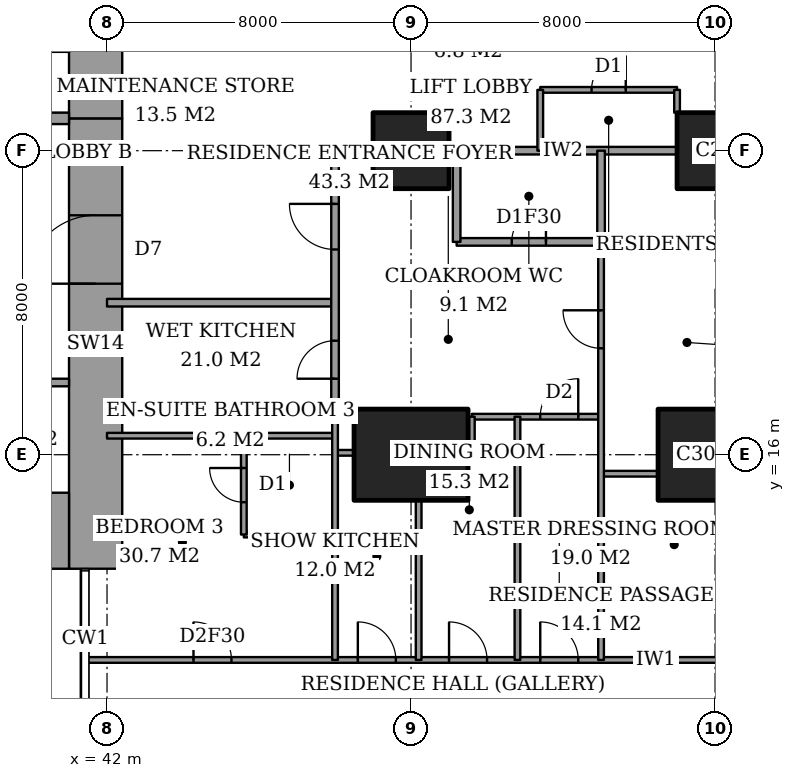
"""IFC4 building model, lengths in metres.
Left out: names, types, materials, properties, quantities, classifications, styles, units other than length and angle.
Written with IfcOpenShell. Run it as: python <this file> out.ifc"""

import sys

from ifc_helpers import new_model, si_unit, direction, frame, frame_2d, origin, origin_2d, place, context, subcontext, project, spatial, rectangle, extrude, element, fill, save


model = new_model("IFC4")
c1 = context("Model", 3, precision=1e-05, world=origin(), true_north=direction((0.0, 1.0)))
c2 = subcontext(c1, "Body", "Model", "MODEL_VIEW")
j1 = project(units=[si_unit("LENGTHUNIT", "METRE"), si_unit("PLANEANGLEUNIT", "RADIAN")], contexts=[c1])
p1 = place(None, origin())
s1 = spatial("IfcSite", under=j1, at=p1, CompositionType="ELEMENT")
p2 = place(p1, origin())
s2 = spatial("IfcBuilding", under=s1, at=p2, CompositionType="ELEMENT")
p3 = place(p2, frame((0.0, 0.0, 58.4)))
s3 = spatial("IfcBuildingStorey", under=s2, at=p3, CompositionType="ELEMENT", Elevation=58.4)
p4 = place(p3, frame((50.0, 16.0, 0.0), z_axis=(0.0, 0.0, 1.0), x_axis=(1.0, 0.0, 0.0)))
e1 = element("IfcColumn", 1, at=p4, inside=s3, PredefinedType="COLUMN", context=c2, shape_type="SweptSolid", body=[
    extrude(rectangle(XDim=3.0, YDim=2.4, at=origin_2d()), origin(), (0.0, 0.0, 1.0), 3.6),
])
p5 = place(p3, frame((50.0, 24.0, 0.0), z_axis=(0.0, 0.0, 1.0), x_axis=(1.0, 0.0, 0.0)))
e2 = element("IfcColumn", 2, at=p5, inside=s3, PredefinedType="COLUMN", context=c2, shape_type="SweptSolid", body=[
    extrude(rectangle(XDim=2.0, YDim=2.0, at=origin_2d()), origin(), (0.0, 0.0, 1.0), 3.6),
])
p6 = place(p3, frame((58.0, 16.0, 0.0), z_axis=(0.0, 0.0, 1.0), x_axis=(1.0, 0.0, 0.0)))
e3 = element("IfcColumn", 3, at=p6, inside=s3, PredefinedType="COLUMN", context=c2, shape_type="SweptSolid", body=[
    extrude(rectangle(XDim=3.0, YDim=2.4, at=origin_2d()), origin(), (0.0, 0.0, 1.0), 3.6),
])
p7 = place(p3, frame((58.0, 24.0, 0.0), z_axis=(0.0, 0.0, 1.0), x_axis=(1.0, 0.0, 0.0)))
e4 = element("IfcColumn", 4, at=p7, inside=s3, PredefinedType="COLUMN", context=c2, shape_type="SweptSolid", body=[
    extrude(rectangle(XDim=2.0, YDim=2.0, at=origin_2d()), origin(), (0.0, 0.0, 1.0), 3.6),
])
p8 = place(p3, frame((37.85, 14.0, 0.0), z_axis=(0.0, 0.0, 1.0), x_axis=(1.0, 0.0, 0.0)))
e5 = element("IfcWall", 5, at=p8, inside=s3, PredefinedType="SHEAR", context=c2, shape_type="SweptSolid", body=[
    extrude(rectangle(XDim=3.15, YDim=2.0, at=frame_2d((1.575, 0.0))), origin(), (0.0, 0.0, 1.0), 3.6),
])
p9 = place(p3, frame((41.7, 13.0, 0.0), z_axis=(0.0, 0.0, 1.0), x_axis=(0.0, 1.0, 0.0)))
e6 = element("IfcWall", 6, at=p9, inside=s3, PredefinedType="SHEAR", context=c2, shape_type="SweptSolid", body=[
    extrude(rectangle(XDim=11.85, YDim=1.4, at=frame_2d((5.925, 0.0))), origin(), (0.0, 0.0, 1.0), 3.6),
])
p10 = place(p9, frame((7.5, 0.0, 0.0)))
e7 = element("IfcOpeningElement", 7, at=p10, cuts=e6, PredefinedType="OPENING", context=c2, shape_type="SweptSolid", body=[
    extrude(rectangle(XDim=1.8, YDim=2.4, at=frame_2d((0.9, 1.2))), frame((0.0, 0.71, 0.0), z_axis=(0.0, -1.0, 0.0), x_axis=(1.0, 0.0, 0.0)), (0.0, 0.0, 1.0), 1.42),
])
p11 = place(p3, frame((41.7, 24.85, 0.0), z_axis=(0.0, 0.0, 1.0), x_axis=(0.0, 1.0, 0.0)))
e8 = element("IfcWall", 8, at=p11, inside=s3, PredefinedType="SHEAR", context=c2, shape_type="SweptSolid", body=[
    extrude(rectangle(XDim=10.15, YDim=1.4, at=frame_2d((5.075, 0.0))), origin(), (0.0, 0.0, 1.0), 3.6),
])
p12 = place(p3, frame((37.85, 24.85, 0.0), z_axis=(0.0, 0.0, 1.0), x_axis=(1.0, 0.0, 0.0)))
e9 = element("IfcWall", 9, at=p12, inside=s3, PredefinedType="SHEAR", context=c2, shape_type="SweptSolid", body=[
    extrude(rectangle(XDim=3.15, YDim=0.3, at=frame_2d((1.575, 0.0))), origin(), (0.0, 0.0, 1.0), 3.6),
])
p13 = place(p12, frame((0.95, 0.0, 0.0)))
e10 = element("IfcOpeningElement", 10, at=p13, cuts=e9, PredefinedType="OPENING", context=c2, shape_type="SweptSolid", body=[
    extrude(rectangle(XDim=1.0, YDim=2.1, at=frame_2d((0.5, 1.05))), frame((0.0, 0.16, 0.0), z_axis=(0.0, -1.0, 0.0), x_axis=(1.0, 0.0, 0.0)), (0.0, 0.0, 1.0), 0.32),
])
p14 = place(p3, frame((41.439, 10.6, 0.0), z_axis=(0.0, 0.0, 1.0), x_axis=(1.0, 0.0, 0.0)))
e11 = element("IfcWall", 11, at=p14, inside=s3, PredefinedType="PARTITIONING", context=c2, shape_type="SweptSolid", body=[
    extrude(rectangle(XDim=25.011, YDim=0.15, at=frame_2d((12.505, 0.0))), origin(), (0.0, 0.0, 1.0), 3.35),
])
p15 = place(p14, frame((11.961, 0.0, 0.0)))
e12 = element("IfcOpeningElement", 12, at=p15, cuts=e11, PredefinedType="OPENING", context=c2, shape_type="SweptSolid", body=[
    extrude(rectangle(XDim=1.0, YDim=2.1, at=frame_2d((0.5, 1.05))), frame((0.0, 0.085, 0.0), z_axis=(0.0, -1.0, 0.0), x_axis=(1.0, 0.0, 0.0)), (0.0, 0.0, 1.0), 0.17),
])
p16 = place(p14, frame((20.924, 0.0, 0.0)))
e13 = element("IfcOpeningElement", 13, at=p16, cuts=e11, PredefinedType="OPENING", context=c2, shape_type="SweptSolid", body=[
    extrude(rectangle(XDim=1.0, YDim=2.1, at=frame_2d((0.5, 1.05))), frame((0.0, 0.085, 0.0), z_axis=(0.0, -1.0, 0.0), x_axis=(1.0, 0.0, 0.0)), (0.0, 0.0, 1.0), 0.17),
])
p17 = place(p14, frame((9.561, 0.0, 0.0)))
e14 = element("IfcOpeningElement", 14, at=p17, cuts=e11, PredefinedType="OPENING", context=c2, shape_type="SweptSolid", body=[
    extrude(rectangle(XDim=1.0, YDim=2.1, at=frame_2d((0.5, 1.05))), frame((0.0, 0.085, 0.0), z_axis=(0.0, -1.0, 0.0), x_axis=(1.0, 0.0, 0.0)), (0.0, 0.0, 1.0), 0.17),
])
p18 = place(p14, frame((7.161, 0.0, 0.0)))
e15 = element("IfcOpeningElement", 15, at=p18, cuts=e11, PredefinedType="OPENING", context=c2, shape_type="SweptSolid", body=[
    extrude(rectangle(XDim=1.0, YDim=2.1, at=frame_2d((0.5, 1.05))), frame((0.0, 0.085, 0.0), z_axis=(0.0, -1.0, 0.0), x_axis=(1.0, 0.0, 0.0)), (0.0, 0.0, 1.0), 0.17),
])
p19 = place(p14, frame((2.836, 0.0, 0.0)))
e16 = element("IfcOpeningElement", 16, at=p19, cuts=e11, PredefinedType="OPENING", context=c2, shape_type="SweptSolid", body=[
    extrude(rectangle(XDim=1.0, YDim=2.1, at=frame_2d((0.5, 1.05))), frame((0.0, 0.085, 0.0), z_axis=(0.0, -1.0, 0.0), x_axis=(1.0, 0.0, 0.0)), (0.0, 0.0, 1.0), 0.17),
])
p20 = place(p3, frame((45.6, 13.9, 0.0), z_axis=(0.0, 0.0, 1.0), x_axis=(1.0, 0.0, 0.0)))
e17 = element("IfcWall", 17, at=p20, inside=s3, PredefinedType="PARTITIONING", context=c2, shape_type="SweptSolid", body=[
    extrude(rectangle(XDim=2.4, YDim=0.15, at=frame_2d((1.2, 0.0))), origin(), (0.0, 0.0, 1.0), 3.35),
])
p21 = place(p3, frame((55.0, 15.5, 0.0), z_axis=(0.0, 0.0, 1.0), x_axis=(1.0, 0.0, 0.0)))
e18 = element("IfcWall", 18, at=p21, inside=s3, PredefinedType="PARTITIONING", context=c2, shape_type="SweptSolid", body=[
    extrude(rectangle(XDim=1.5, YDim=0.15, at=frame_2d((0.75, 0.0))), origin(), (0.0, 0.0, 1.0), 3.35),
])
p22 = place(p3, frame((48.0, 16.05, 0.0), z_axis=(0.0, 0.0, 1.0), x_axis=(1.0, 0.0, 0.0)))
e19 = element("IfcWall", 19, at=p22, inside=s3, PredefinedType="PARTITIONING", context=c2, shape_type="SweptSolid", body=[
    extrude(rectangle(XDim=0.5, YDim=0.15, at=frame_2d((0.25, 0.0))), origin(), (0.0, 0.0, 1.0), 2.634),
])
p23 = place(p3, frame((42.0, 16.5, 0.0), z_axis=(0.0, 0.0, 1.0), x_axis=(1.0, 0.0, 0.0)))
e20 = element("IfcWall", 20, at=p23, inside=s3, PredefinedType="PARTITIONING", context=c2, shape_type="SweptSolid", body=[
    extrude(rectangle(XDim=6.0, YDim=0.15, at=frame_2d((3.0, 0.0))), origin(), (0.0, 0.0, 1.0), 3.35),
])
p24 = place(p3, frame((51.6, 17.0, 0.0), z_axis=(0.0, 0.0, 1.0), x_axis=(1.0, 0.0, 0.0)))
e21 = element("IfcWall", 21, at=p24, inside=s3, PredefinedType="PARTITIONING", context=c2, shape_type="SweptSolid", body=[
    extrude(rectangle(XDim=3.4, YDim=0.15, at=frame_2d((1.7, 0.0))), origin(), (0.0, 0.0, 1.0), 3.35),
])
p25 = place(p24, frame((1.8, 0.0, 0.0)))
e22 = element("IfcOpeningElement", 22, at=p25, cuts=e21, PredefinedType="OPENING", context=c2, shape_type="SweptSolid", body=[
    extrude(rectangle(XDim=1.0, YDim=2.1, at=frame_2d((0.5, 1.05))), frame((0.0, 0.085, 0.0), z_axis=(0.0, -1.0, 0.0), x_axis=(1.0, 0.0, 0.0)), (0.0, 0.0, 1.0), 0.17),
])
p26 = place(p3, frame((42.0, 20.0, 0.0), z_axis=(0.0, 0.0, 1.0), x_axis=(1.0, 0.0, 0.0)))
e23 = element("IfcWall", 23, at=p26, inside=s3, PredefinedType="PARTITIONING", context=c2, shape_type="SweptSolid", body=[
    extrude(rectangle(XDim=6.0, YDim=0.2, at=frame_2d((3.0, 0.0))), origin(), (0.0, 0.0, 1.0), 3.35),
])
p27 = place(p3, frame((51.2, 21.6, 0.0), z_axis=(0.0, 0.0, 1.0), x_axis=(1.0, 0.0, 0.0)))
e24 = element("IfcWall", 24, at=p27, inside=s3, PredefinedType="PARTITIONING", context=c2, shape_type="SweptSolid", body=[
    extrude(rectangle(XDim=3.8, YDim=0.2, at=frame_2d((1.9, 0.0))), origin(), (0.0, 0.0, 1.0), 3.35),
])
p28 = place(p27, frame((1.45, 0.0, 0.0)))
e25 = element("IfcOpeningElement", 25, at=p28, cuts=e24, PredefinedType="OPENING", context=c2, shape_type="SweptSolid", body=[
    extrude(rectangle(XDim=0.9, YDim=2.1, at=frame_2d((0.45, 1.05))), frame((0.0, 0.11, 0.0), z_axis=(0.0, -1.0, 0.0), x_axis=(1.0, 0.0, 0.0)), (0.0, 0.0, 1.0), 0.22),
])
p29 = place(p3, frame((48.0, 24.0, 0.0), z_axis=(0.0, 0.0, 1.0), x_axis=(1.0, 0.0, 0.0)))
e26 = element("IfcWall", 26, at=p29, inside=s3, PredefinedType="PARTITIONING", context=c2, shape_type="SweptSolid", body=[
    extrude(rectangle(XDim=1.0, YDim=0.2, at=frame_2d((0.5, 0.0))), origin(), (0.0, 0.0, 1.0), 3.35),
])
p30 = place(p3, frame((51.0, 24.0, 0.0), z_axis=(0.0, 0.0, 1.0), x_axis=(1.0, 0.0, 0.0)))
e27 = element("IfcWall", 27, at=p30, inside=s3, PredefinedType="PARTITIONING", context=c2, shape_type="SweptSolid", body=[
    extrude(rectangle(XDim=6.0, YDim=0.2, at=frame_2d((3.0, 0.0))), origin(), (0.0, 0.0, 1.0), 3.35),
])
p31 = place(p3, frame((53.4, 25.6, 0.0), z_axis=(0.0, 0.0, 1.0), x_axis=(1.0, 0.0, 0.0)))
e28 = element("IfcWall", 28, at=p31, inside=s3, PredefinedType="PARTITIONING", context=c2, shape_type="SweptSolid", body=[
    extrude(rectangle(XDim=3.6, YDim=0.15, at=frame_2d((1.8, 0.0))), origin(), (0.0, 0.0, 1.0), 3.35),
])
p32 = place(p31, frame((1.35, 0.0, 0.0)))
e29 = element("IfcOpeningElement", 29, at=p32, cuts=e28, PredefinedType="OPENING", context=c2, shape_type="SweptSolid", body=[
    extrude(rectangle(XDim=0.9, YDim=2.1, at=frame_2d((0.45, 1.05))), frame((0.0, 0.085, 0.0), z_axis=(0.0, -1.0, 0.0), x_axis=(1.0, 0.0, 0.0)), (0.0, 0.0, 1.0), 0.17),
])
p33 = place(p3, frame((45.6, 13.9, 0.0), z_axis=(0.0, 0.0, 1.0), x_axis=(0.0, 1.0, 0.0)))
e30 = element("IfcWall", 30, at=p33, inside=s3, PredefinedType="PARTITIONING", context=c2, shape_type="SweptSolid", body=[
    extrude(rectangle(XDim=2.6, YDim=0.15, at=frame_2d((1.3, 0.0))), origin(), (0.0, 0.0, 1.0), 3.35),
])
p34 = place(p33, frame((0.85, 0.0, 0.0)))
e31 = element("IfcOpeningElement", 31, at=p34, cuts=e30, PredefinedType="OPENING", context=c2, shape_type="SweptSolid", body=[
    extrude(rectangle(XDim=0.9, YDim=2.1, at=frame_2d((0.45, 1.05))), frame((0.0, 0.085, 0.0), z_axis=(0.0, -1.0, 0.0), x_axis=(1.0, 0.0, 0.0)), (0.0, 0.0, 1.0), 0.17),
])
p35 = place(p3, frame((48.0, 17.0, 0.0), z_axis=(0.0, 0.0, 1.0), x_axis=(0.0, 1.0, 0.0)))
e32 = element("IfcWall", 32, at=p35, inside=s3, PredefinedType="PARTITIONING", context=c2, shape_type="SweptSolid", body=[
    extrude(rectangle(XDim=7.0, YDim=0.2, at=frame_2d((3.5, 0.0))), origin(), (0.0, 0.0, 1.0), 3.35),
])
p36 = place(p35, frame((4.4, 0.0, 0.0)))
e33 = element("IfcOpeningElement", 33, at=p36, cuts=e32, PredefinedType="OPENING", context=c2, shape_type="SweptSolid", body=[
    extrude(rectangle(XDim=1.2, YDim=2.4, at=frame_2d((0.6, 1.2))), frame((0.0, 0.11, 0.0), z_axis=(0.0, -1.0, 0.0), x_axis=(1.0, 0.0, 0.0)), (0.0, 0.0, 1.0), 0.22),
])
p37 = place(p35, frame((1.0, 0.0, 0.0)))
e34 = element("IfcOpeningElement", 34, at=p37, cuts=e32, PredefinedType="OPENING", context=c2, shape_type="SweptSolid", body=[
    extrude(rectangle(XDim=1.0, YDim=2.1, at=frame_2d((0.5, 1.05))), frame((0.0, 0.11, 0.0), z_axis=(0.0, -1.0, 0.0), x_axis=(1.0, 0.0, 0.0)), (0.0, 0.0, 1.0), 0.22),
])
p38 = place(p3, frame((48.0, 10.6, 0.0), z_axis=(0.0, 0.0, 1.0), x_axis=(0.0, 1.0, 0.0)))
e35 = element("IfcWall", 35, at=p38, inside=s3, PredefinedType="PARTITIONING", context=c2, shape_type="SweptSolid", body=[
    extrude(rectangle(XDim=6.4, YDim=0.15, at=frame_2d((3.2, 0.0))), origin(), (0.0, 0.0, 1.0), 3.35),
])
p39 = place(p3, frame((50.2, 10.6, 0.0), z_axis=(0.0, 0.0, 1.0), x_axis=(0.0, 1.0, 0.0)))
e36 = element("IfcWall", 36, at=p39, inside=s3, PredefinedType="PARTITIONING", context=c2, shape_type="SweptSolid", body=[
    extrude(rectangle(XDim=4.2, YDim=0.15, at=frame_2d((2.1, 0.0))), origin(), (0.0, 0.0, 1.0), 3.35),
])
p40 = place(p3, frame((51.2, 21.6, 0.0), z_axis=(0.0, 0.0, 1.0), x_axis=(0.0, 1.0, 0.0)))
e37 = element("IfcWall", 37, at=p40, inside=s3, PredefinedType="PARTITIONING", context=c2, shape_type="SweptSolid", body=[
    extrude(rectangle(XDim=2.4, YDim=0.2, at=frame_2d((1.2, 0.0))), origin(), (0.0, 0.0, 1.0), 3.35),
])
p41 = place(p3, frame((51.6, 16.05, 0.0), z_axis=(0.0, 0.0, 1.0), x_axis=(0.0, 1.0, 0.0)))
e38 = element("IfcWall", 38, at=p41, inside=s3, PredefinedType="PARTITIONING", context=c2, shape_type="SweptSolid", body=[
    extrude(rectangle(XDim=0.95, YDim=0.15, at=frame_2d((0.475, 0.0))), origin(), (0.0, 0.0, 1.0), 3.35),
])
p42 = place(p3, frame((52.8, 10.6, 0.0), z_axis=(0.0, 0.0, 1.0), x_axis=(0.0, 1.0, 0.0)))
e39 = element("IfcWall", 39, at=p42, inside=s3, PredefinedType="PARTITIONING", context=c2, shape_type="SweptSolid", body=[
    extrude(rectangle(XDim=6.4, YDim=0.15, at=frame_2d((3.2, 0.0))), origin(), (0.0, 0.0, 1.0), 3.35),
])
p43 = place(p3, frame((53.4, 24.0, 0.0), z_axis=(0.0, 0.0, 1.0), x_axis=(0.0, 1.0, 0.0)))
e40 = element("IfcWall", 40, at=p43, inside=s3, PredefinedType="PARTITIONING", context=c2, shape_type="SweptSolid", body=[
    extrude(rectangle(XDim=1.6, YDim=0.15, at=frame_2d((0.8, 0.0))), origin(), (0.0, 0.0, 1.0), 3.35),
])
p44 = place(p3, frame((55.0, 21.6, 0.0), z_axis=(0.0, 0.0, 1.0), x_axis=(0.0, 1.0, 0.0)))
e41 = element("IfcWall", 41, at=p44, inside=s3, PredefinedType="PARTITIONING", context=c2, shape_type="SweptSolid", body=[
    extrude(rectangle(XDim=2.4, YDim=0.2, at=frame_2d((1.2, 0.0))), origin(), (0.0, 0.0, 1.0), 3.35),
])
p45 = place(p3, frame((55.0, 10.6, 0.0), z_axis=(0.0, 0.0, 1.0), x_axis=(0.0, 1.0, 0.0)))
e42 = element("IfcWall", 42, at=p45, inside=s3, PredefinedType="PARTITIONING", context=c2, shape_type="SweptSolid", body=[
    extrude(rectangle(XDim=11.0, YDim=0.15, at=frame_2d((5.5, 0.0))), origin(), (0.0, 0.0, 1.0), 3.35),
])
p46 = place(p45, frame((8.2, 0.0, 0.0)))
e43 = element("IfcOpeningElement", 43, at=p46, cuts=e42, PredefinedType="OPENING", context=c2, shape_type="SweptSolid", body=[
    extrude(rectangle(XDim=1.0, YDim=2.1, at=frame_2d((0.5, 1.05))), frame((0.0, 0.085, 0.0), z_axis=(0.0, -1.0, 0.0), x_axis=(1.0, 0.0, 0.0)), (0.0, 0.0, 1.0), 0.17),
])
p47 = place(p3, frame((57.0, 25.0, 0.0), z_axis=(0.0, 0.0, 1.0), x_axis=(0.0, 1.0, 0.0)))
e44 = element("IfcWall", 44, at=p47, inside=s3, PredefinedType="PARTITIONING", context=c2, shape_type="SweptSolid", body=[
    extrude(rectangle(XDim=0.6, YDim=0.15, at=frame_2d((0.3, 0.0))), origin(), (0.0, 0.0, 1.0), 3.35),
])
p48 = place(p3, frame((28.3, 17.9, 0.0), z_axis=(0.0, 0.0, 1.0), x_axis=(1.0, 0.0, 0.0)))
e45 = element("IfcWall", 45, at=p48, inside=s3, PredefinedType="PARTITIONING", context=c2, shape_type="SweptSolid", body=[
    extrude(rectangle(XDim=12.7, YDim=0.2, at=frame_2d((6.35, 0.0))), origin(), (0.0, 0.0, 1.0), 3.6),
])
p49 = place(p48, frame((0.95, 0.0, 0.0)))
e46 = element("IfcOpeningElement", 46, at=p49, cuts=e45, PredefinedType="OPENING", context=c2, shape_type="SweptSolid", body=[
    extrude(rectangle(XDim=1.1, YDim=2.1, at=frame_2d((0.55, 1.05))), frame((0.0, 0.11, 0.0), z_axis=(0.0, -1.0, 0.0), x_axis=(1.0, 0.0, 0.0)), (0.0, 0.0, 1.0), 0.22),
])
p50 = place(p48, frame((4.15, 0.0, 0.0)))
e47 = element("IfcOpeningElement", 47, at=p50, cuts=e45, PredefinedType="OPENING", context=c2, shape_type="SweptSolid", body=[
    extrude(rectangle(XDim=1.1, YDim=2.1, at=frame_2d((0.55, 1.05))), frame((0.0, 0.11, 0.0), z_axis=(0.0, -1.0, 0.0), x_axis=(1.0, 0.0, 0.0)), (0.0, 0.0, 1.0), 0.22),
])
p51 = place(p48, frame((7.35, 0.0, 0.0)))
e48 = element("IfcOpeningElement", 48, at=p51, cuts=e45, PredefinedType="OPENING", context=c2, shape_type="SweptSolid", body=[
    extrude(rectangle(XDim=1.1, YDim=2.1, at=frame_2d((0.55, 1.05))), frame((0.0, 0.11, 0.0), z_axis=(0.0, -1.0, 0.0), x_axis=(1.0, 0.0, 0.0)), (0.0, 0.0, 1.0), 0.22),
])
p52 = place(p48, frame((10.6, 0.0, 0.0)))
e49 = element("IfcOpeningElement", 49, at=p52, cuts=e45, PredefinedType="OPENING", context=c2, shape_type="SweptSolid", body=[
    extrude(rectangle(XDim=1.2, YDim=2.1, at=frame_2d((0.6, 1.05))), frame((0.0, 0.11, 0.0), z_axis=(0.0, -1.0, 0.0), x_axis=(1.0, 0.0, 0.0)), (0.0, 0.0, 1.0), 0.22),
])
p53 = place(p15, origin())
e50 = element("IfcDoor", 50, at=p53, inside=s3, OperationType="SINGLE_SWING_RIGHT", PredefinedType="DOOR", context=c2, shape_type="SweptSolid", body=[
    extrude(rectangle(XDim=1.0, YDim=2.1, at=frame_2d((0.5, 1.05))), frame((0.0, 0.025, 0.0), z_axis=(0.0, -1.0, 0.0), x_axis=(1.0, 0.0, 0.0)), (0.0, 0.0, 1.0), 0.05),
])
fill(e12, e50)
p54 = place(p46, origin())
e51 = element("IfcDoor", 51, at=p54, inside=s3, OperationType="SINGLE_SWING_LEFT", PredefinedType="DOOR", context=c2, shape_type="SweptSolid", body=[
    extrude(rectangle(XDim=1.0, YDim=2.1, at=frame_2d((0.5, 1.05))), frame((0.0, 0.025, 0.0), z_axis=(0.0, -1.0, 0.0), x_axis=(1.0, 0.0, 0.0)), (0.0, 0.0, 1.0), 0.05),
])
fill(e43, e51)
p55 = place(p28, origin())
e52 = element("IfcDoor", 52, at=p55, inside=s3, OperationType="SINGLE_SWING_LEFT", PredefinedType="DOOR", context=c2, shape_type="SweptSolid", body=[
    extrude(rectangle(XDim=0.9, YDim=2.1, at=frame_2d((0.45, 1.05))), frame((0.0, 0.025, 0.0), z_axis=(0.0, -1.0, 0.0), x_axis=(1.0, 0.0, 0.0)), (0.0, 0.0, 1.0), 0.05),
])
fill(e25, e52)
p56 = place(p36, origin())
e53 = element("IfcDoor", 53, at=p56, inside=s3, OperationType="SINGLE_SWING_LEFT", PredefinedType="DOOR", context=c2, shape_type="SweptSolid", body=[
    extrude(rectangle(XDim=1.2, YDim=2.4, at=frame_2d((0.6, 1.2))), frame((0.0, 0.025, 0.0), z_axis=(0.0, -1.0, 0.0), x_axis=(1.0, 0.0, 0.0)), (0.0, 0.0, 1.0), 0.05),
])
fill(e33, e53)
p57 = place(p25, origin())
e54 = element("IfcDoor", 54, at=p57, inside=s3, OperationType="SINGLE_SWING_LEFT", PredefinedType="DOOR", context=c2, shape_type="SweptSolid", body=[
    extrude(rectangle(XDim=1.0, YDim=2.1, at=frame_2d((0.5, 1.05))), frame((0.0, 0.025, 0.0), z_axis=(0.0, -1.0, 0.0), x_axis=(1.0, 0.0, 0.0)), (0.0, 0.0, 1.0), 0.05),
])
fill(e22, e54)
p58 = place(p17, origin())
e55 = element("IfcDoor", 55, at=p58, inside=s3, OperationType="SINGLE_SWING_RIGHT", PredefinedType="DOOR", context=c2, shape_type="SweptSolid", body=[
    extrude(rectangle(XDim=1.0, YDim=2.1, at=frame_2d((0.5, 1.05))), frame((0.0, 0.025, 0.0), z_axis=(0.0, -1.0, 0.0), x_axis=(1.0, 0.0, 0.0)), (0.0, 0.0, 1.0), 0.05),
])
fill(e14, e55)
p59 = place(p18, origin())
e56 = element("IfcDoor", 56, at=p59, inside=s3, OperationType="SINGLE_SWING_RIGHT", PredefinedType="DOOR", context=c2, shape_type="SweptSolid", body=[
    extrude(rectangle(XDim=1.0, YDim=2.1, at=frame_2d((0.5, 1.05))), frame((0.0, 0.025, 0.0), z_axis=(0.0, -1.0, 0.0), x_axis=(1.0, 0.0, 0.0)), (0.0, 0.0, 1.0), 0.05),
])
fill(e15, e56)
p60 = place(p34, origin())
e57 = element("IfcDoor", 57, at=p60, inside=s3, OperationType="SINGLE_SWING_LEFT", PredefinedType="DOOR", context=c2, shape_type="SweptSolid", body=[
    extrude(rectangle(XDim=0.9, YDim=2.1, at=frame_2d((0.45, 1.05))), frame((0.0, 0.025, 0.0), z_axis=(0.0, -1.0, 0.0), x_axis=(1.0, 0.0, 0.0)), (0.0, 0.0, 1.0), 0.05),
])
fill(e31, e57)
p61 = place(p19, origin())
e58 = element("IfcDoor", 58, at=p61, inside=s3, OperationType="SINGLE_SWING_RIGHT", PredefinedType="DOOR", context=c2, shape_type="SweptSolid", body=[
    extrude(rectangle(XDim=1.0, YDim=2.1, at=frame_2d((0.5, 1.05))), frame((0.0, 0.025, 0.0), z_axis=(0.0, -1.0, 0.0), x_axis=(1.0, 0.0, 0.0)), (0.0, 0.0, 1.0), 0.05),
])
fill(e16, e58)
p62 = place(p37, origin())
e59 = element("IfcDoor", 59, at=p62, inside=s3, OperationType="SINGLE_SWING_RIGHT", PredefinedType="DOOR", context=c2, shape_type="SweptSolid", body=[
    extrude(rectangle(XDim=1.0, YDim=2.1, at=frame_2d((0.5, 1.05))), frame((0.0, 0.025, 0.0), z_axis=(0.0, -1.0, 0.0), x_axis=(1.0, 0.0, 0.0)), (0.0, 0.0, 1.0), 0.05),
])
fill(e34, e59)
p63 = place(p32, origin())
e60 = element("IfcDoor", 60, at=p63, inside=s3, OperationType="SINGLE_SWING_LEFT", PredefinedType="DOOR", context=c2, shape_type="SweptSolid", body=[
    extrude(rectangle(XDim=0.9, YDim=2.1, at=frame_2d((0.45, 1.05))), frame((0.0, 0.025, 0.0), z_axis=(0.0, -1.0, 0.0), x_axis=(1.0, 0.0, 0.0)), (0.0, 0.0, 1.0), 0.05),
])
fill(e29, e60)
p64 = place(p10, origin())
e61 = element("IfcDoor", 61, at=p64, inside=s3, OperationType="DOUBLE_DOOR_DOUBLE_SWING", PredefinedType="DOOR", context=c2, shape_type="SweptSolid", body=[
    extrude(rectangle(XDim=1.8, YDim=2.4, at=frame_2d((0.9, 1.2))), frame((0.0, 0.025, 0.0), z_axis=(0.0, -1.0, 0.0), x_axis=(1.0, 0.0, 0.0)), (0.0, 0.0, 1.0), 0.05),
])
fill(e7, e61)
save(model, sys.argv[1])
